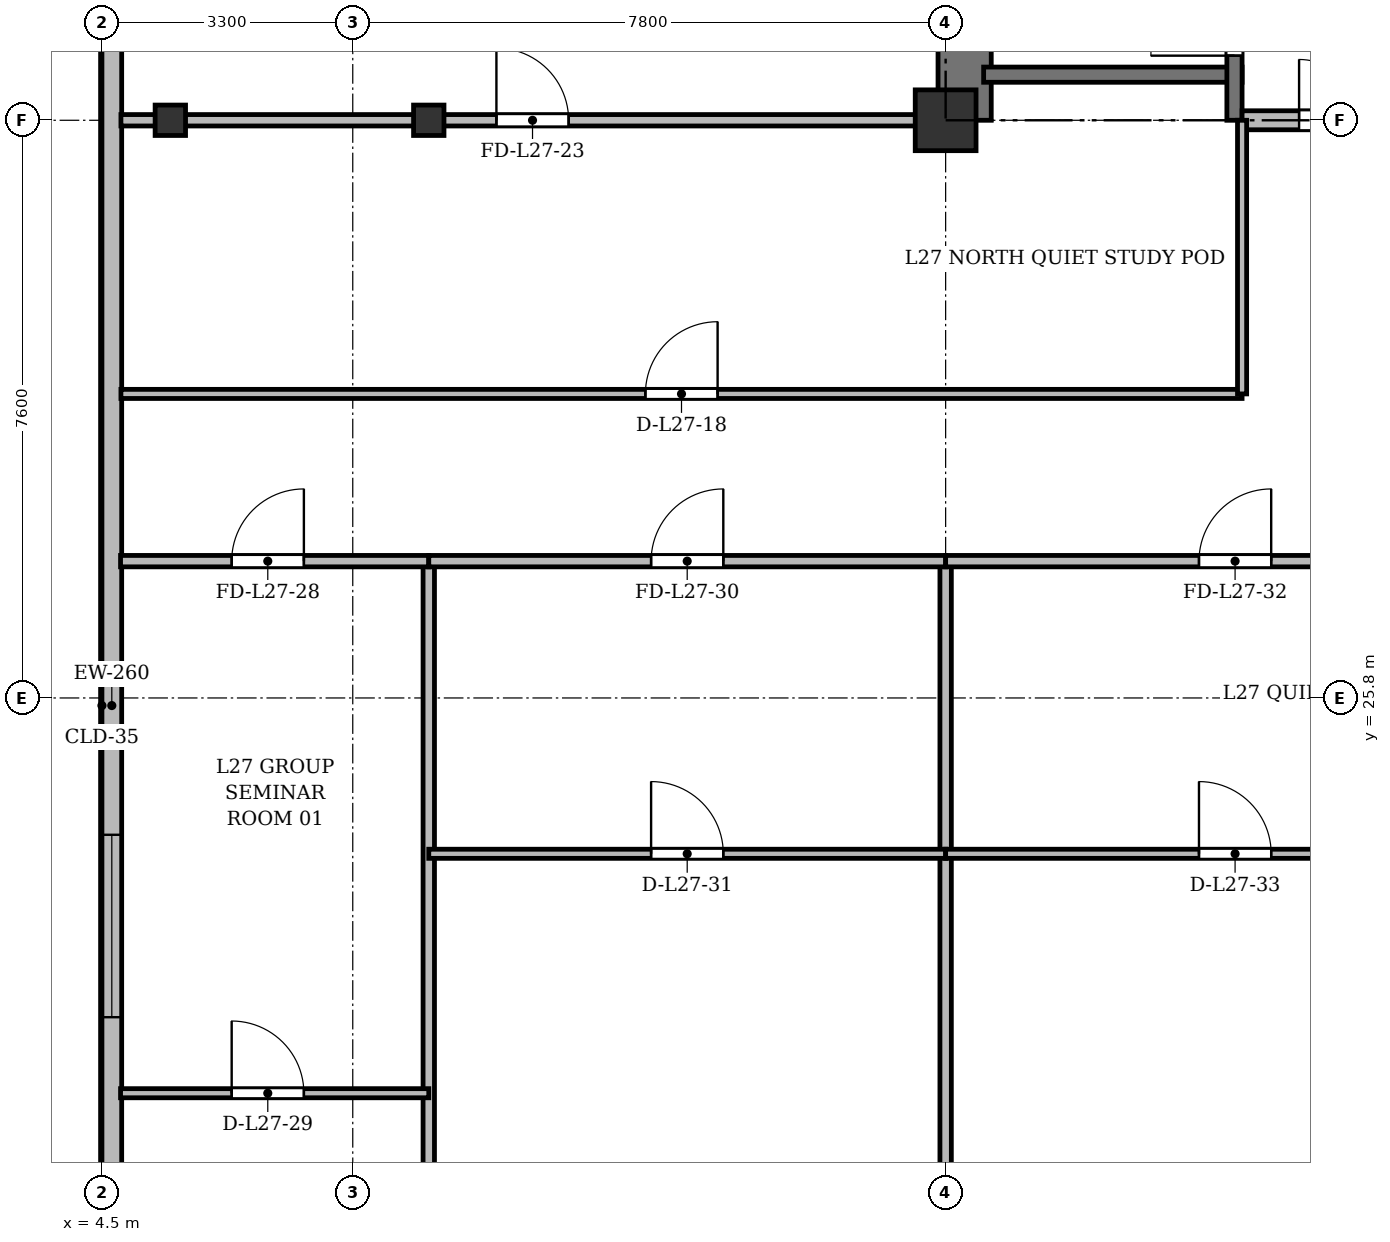
"""IFC4 building model, lengths in metres.
Left out: names, types, materials, properties, quantities, classifications, styles, units other than length and angle.
Written with IfcOpenShell. Run it as: python <this file> out.ifc"""

import sys

from ifc_helpers import new_model, si_unit, direction, frame, frame_2d, origin, origin_2d, place, context, subcontext, project, spatial, rectangle, i_section, extrude, source, transform, mapped, element, fill, save


model = new_model("IFC4")
c1 = context("Model", 3, precision=1e-05, world=origin(), true_north=direction((0.0, 1.0)))
c2 = subcontext(c1, "Body", "Model", "MODEL_VIEW")
j1 = project(units=[si_unit("LENGTHUNIT", "METRE"), si_unit("PLANEANGLEUNIT", "RADIAN")], contexts=[c1])
p1 = place(None, origin())
s1 = spatial("IfcSite", under=j1, at=p1, CompositionType="ELEMENT")
p2 = place(p1, origin())
s2 = spatial("IfcBuilding", under=s1, at=p2, CompositionType="ELEMENT")
p3 = place(p2, frame((0.0, 0.0, 106.9)))
s3 = spatial("IfcBuildingStorey", under=s2, at=p3, CompositionType="ELEMENT", Elevation=106.9)
m1 = source(origin(), c2, "Body", "SweptSolid", [
    extrude(i_section(OverallWidth=0.4, OverallDepth=0.4, WebThickness=0.022, FlangeThickness=0.035, at=origin_2d()), origin(), (0.0, 0.0, 1.0), 3.6),
])
for number, where, z_axis, x_axis in (
    (1, (5.4, 33.4, 0.0), (0.0, 0.0, 1.0), (1.0, 0.0, 0.0)),
    (2, (8.8, 33.4, 0.0), (0.0, 0.0, 1.0), (1.0, 0.0, 0.0)),
):
    element("IfcColumn", number, at=place(p3, frame(where, z_axis=z_axis, x_axis=x_axis)), inside=s3, PredefinedType="COLUMN", context=c2, shape_type="MappedRepresentation", body=[
        mapped(m1, transform((0.0, 0.0, 0.0), x_axis=(1.0, 0.0, 0.0), y_axis=(0.0, 1.0, 0.0), z_axis=(0.0, 0.0, 1.0), scale=1.0)),
    ])
m2 = source(origin(), c2, "Body", "SweptSolid", [
    extrude(rectangle(XDim=0.8, YDim=0.8, at=origin_2d()), origin(), (0.0, 0.0, 1.0), 3.6),
])
p4 = place(p3, frame((15.6, 33.4, 0.0), z_axis=(0.0, 0.0, 1.0), x_axis=(1.0, 0.0, 0.0)))
e3 = element("IfcColumn", 3, at=p4, inside=s3, PredefinedType="COLUMN", context=c2, shape_type="MappedRepresentation", body=[
    mapped(m2, transform((0.0, 0.0, 0.0), x_axis=(1.0, 0.0, 0.0), y_axis=(0.0, 1.0, 0.0), z_axis=(0.0, 0.0, 1.0), scale=1.0)),
])
p5 = place(p3, frame((4.63, 5.9, 0.0), z_axis=(0.0, 0.0, 1.0), x_axis=(0.0, 1.0, 0.0)))
e4 = element("IfcWall", 4, at=p5, inside=s3, PredefinedType="SOLIDWALL", context=c2, shape_type="SweptSolid", body=[
    extrude(rectangle(XDim=39.6, YDim=0.26, at=frame_2d((19.8, 0.0))), origin(), (0.0, 0.0, 1.0), 3.34),
])
p6 = place(p5, frame((1.45, 0.0, 0.92)))
e5 = element("IfcOpeningElement", 5, at=p6, cuts=e4, PredefinedType="OPENING", context=c2, shape_type="SweptSolid", body=[
    extrude(rectangle(XDim=1.2, YDim=1.65, at=frame_2d((0.6, 0.825))), frame((0.0, 0.14, 0.0), z_axis=(0.0, -1.0, 0.0), x_axis=(1.0, 0.0, 0.0)), (0.0, 0.0, 1.0), 0.28),
])
p7 = place(p5, frame((4.3, 0.0, 0.92)))
e6 = element("IfcOpeningElement", 6, at=p7, cuts=e4, PredefinedType="OPENING", context=c2, shape_type="SweptSolid", body=[
    extrude(rectangle(XDim=2.4, YDim=2.1, at=frame_2d((1.2, 1.05))), frame((0.0, 0.14, 0.0), z_axis=(0.0, -1.0, 0.0), x_axis=(1.0, 0.0, 0.0)), (0.0, 0.0, 1.0), 0.28),
])
p8 = place(p5, frame((8.5, 0.0, 0.92)))
e7 = element("IfcOpeningElement", 7, at=p8, cuts=e4, PredefinedType="OPENING", context=c2, shape_type="SweptSolid", body=[
    extrude(rectangle(XDim=2.4, YDim=2.1, at=frame_2d((1.2, 1.05))), frame((0.0, 0.14, 0.0), z_axis=(0.0, -1.0, 0.0), x_axis=(1.0, 0.0, 0.0)), (0.0, 0.0, 1.0), 0.28),
])
p9 = place(p5, frame((15.7, 0.0, 0.92)))
e8 = element("IfcOpeningElement", 8, at=p9, cuts=e4, PredefinedType="OPENING", context=c2, shape_type="SweptSolid", body=[
    extrude(rectangle(XDim=2.4, YDim=2.1, at=frame_2d((1.2, 1.05))), frame((0.0, 0.14, 0.0), z_axis=(0.0, -1.0, 0.0), x_axis=(1.0, 0.0, 0.0)), (0.0, 0.0, 1.0), 0.28),
])
p10 = place(p5, frame((29.7, 0.0, 0.92)))
e9 = element("IfcOpeningElement", 9, at=p10, cuts=e4, PredefinedType="OPENING", context=c2, shape_type="SweptSolid", body=[
    extrude(rectangle(XDim=2.4, YDim=2.1, at=frame_2d((1.2, 1.05))), frame((0.0, 0.14, 0.0), z_axis=(0.0, -1.0, 0.0), x_axis=(1.0, 0.0, 0.0)), (0.0, 0.0, 1.0), 0.28),
])
p11 = place(p5, frame((33.9, 0.0, 0.92)))
e10 = element("IfcOpeningElement", 10, at=p11, cuts=e4, PredefinedType="OPENING", context=c2, shape_type="SweptSolid", body=[
    extrude(rectangle(XDim=1.2, YDim=1.65, at=frame_2d((0.6, 0.825))), frame((0.0, 0.14, 0.0), z_axis=(0.0, -1.0, 0.0), x_axis=(1.0, 0.0, 0.0)), (0.0, 0.0, 1.0), 0.28),
])
p12 = place(p5, frame((37.25, 0.0, 0.92)))
e11 = element("IfcOpeningElement", 11, at=p12, cuts=e4, PredefinedType="OPENING", context=c2, shape_type="SweptSolid", body=[
    extrude(rectangle(XDim=1.2, YDim=1.65, at=frame_2d((0.6, 0.825))), frame((0.0, 0.14, 0.0), z_axis=(0.0, -1.0, 0.0), x_axis=(1.0, 0.0, 0.0)), (0.0, 0.0, 1.0), 0.28),
])
p13 = place(p3, frame((15.85, 33.4, 0.0), z_axis=(0.0, 0.0, 1.0), x_axis=(0.0, 1.0, 0.0)))
e12 = element("IfcWall", 12, at=p13, inside=s3, PredefinedType="SHEAR", context=c2, shape_type="SweptSolid", body=[
    extrude(rectangle(XDim=11.7, YDim=0.7, at=frame_2d((5.85, 0.0))), origin(), (0.0, 0.0, 1.0), 3.34),
])
p14 = place(p3, frame((16.1, 34.0, 0.0), z_axis=(0.0, 0.0, 1.0), x_axis=(1.0, 0.0, 0.0)))
e13 = element("IfcWall", 13, at=p14, inside=s3, PredefinedType="SHEAR", context=c2, shape_type="SweptSolid", body=[
    extrude(rectangle(XDim=3.4, YDim=0.2, at=frame_2d((1.7, 0.0))), origin(), (0.0, 0.0, 1.0), 3.34),
])
p15 = place(p3, frame((19.4, 33.4, 0.0), z_axis=(0.0, 0.0, 1.0), x_axis=(0.0, 1.0, 0.0)))
e14 = element("IfcWall", 14, at=p15, inside=s3, PredefinedType="SHEAR", context=c2, shape_type="SweptSolid", body=[
    extrude(rectangle(XDim=11.1, YDim=0.2, at=frame_2d((5.55, 0.0))), origin(), (0.0, 0.0, 1.0), 3.34),
])
p16 = place(p15, frame((0.85, 0.0, 0.0)))
e15 = element("IfcOpeningElement", 15, at=p16, cuts=e14, PredefinedType="OPENING", context=c2, shape_type="SweptSolid", body=[
    extrude(rectangle(XDim=1.1, YDim=2.15, at=frame_2d((0.55, 1.075))), frame((0.0, 0.11, 0.0), z_axis=(0.0, -1.0, 0.0), x_axis=(1.0, 0.0, 0.0)), (0.0, 0.0, 1.0), 0.22),
])
p17 = place(p3, frame((19.5, 33.4, 0.0), z_axis=(0.0, 0.0, 1.0), x_axis=(1.0, 0.0, 0.0)))
e16 = element("IfcWall", 16, at=p17, inside=s3, PredefinedType="PARTITIONING", context=c2, shape_type="SweptSolid", body=[
    extrude(rectangle(XDim=6.8, YDim=0.25, at=frame_2d((3.4, 0.0))), origin(), (0.0, 0.0, 1.0), 2.752),
])
p18 = place(p17, frame((0.75, 0.0, 0.0)))
e17 = element("IfcOpeningElement", 17, at=p18, cuts=e16, PredefinedType="OPENING", context=c2, shape_type="SweptSolid", body=[
    extrude(rectangle(XDim=1.6, YDim=2.2, at=frame_2d((0.8, 1.1))), frame((0.0, 0.135, 0.0), z_axis=(0.0, -1.0, 0.0), x_axis=(1.0, 0.0, 0.0)), (0.0, 0.0, 1.0), 0.27),
])
p19 = place(p3, frame((4.75, 29.8, 0.0), z_axis=(0.0, 0.0, 1.0), x_axis=(1.0, 0.0, 0.0)))
e18 = element("IfcWall", 18, at=p19, inside=s3, PredefinedType="PARTITIONING", context=c2, shape_type="SweptSolid", body=[
    extrude(rectangle(XDim=14.75, YDim=0.12, at=frame_2d((7.375, 0.0))), origin(), (0.0, 0.0, 1.0), 2.84),
])
p20 = place(p19, frame((6.9, 0.0, 0.0)))
e19 = element("IfcOpeningElement", 19, at=p20, cuts=e18, PredefinedType="OPENING", context=c2, shape_type="SweptSolid", body=[
    extrude(rectangle(XDim=0.95, YDim=2.15, at=frame_2d((0.475, 1.075))), frame((0.0, 0.07, 0.0), z_axis=(0.0, -1.0, 0.0), x_axis=(1.0, 0.0, 0.0)), (0.0, 0.0, 1.0), 0.14),
])
p21 = place(p3, frame((19.5, 29.8, 0.0), z_axis=(0.0, 0.0, 1.0), x_axis=(0.0, 1.0, 0.0)))
e20 = element("IfcWall", 20, at=p21, inside=s3, PredefinedType="PARTITIONING", context=c2, shape_type="SweptSolid", body=[
    extrude(rectangle(XDim=3.6, YDim=0.12, at=frame_2d((1.8, 0.0))), origin(), (0.0, 0.0, 1.0), 2.752),
])
p22 = place(p3, frame((4.75, 33.4, 0.0), z_axis=(0.0, 0.0, 1.0), x_axis=(1.0, 0.0, 0.0)))
e21 = element("IfcWall", 21, at=p22, inside=s3, PredefinedType="PARTITIONING", context=c2, shape_type="SweptSolid", body=[
    extrude(rectangle(XDim=10.85, YDim=0.15, at=frame_2d((5.425, 0.0))), origin(), (0.0, 0.0, 1.0), 2.752),
])
p23 = place(p22, frame((4.94, 0.0, 0.0)))
e22 = element("IfcOpeningElement", 22, at=p23, cuts=e21, PredefinedType="OPENING", context=c2, shape_type="SweptSolid", body=[
    extrude(rectangle(XDim=0.95, YDim=2.15, at=frame_2d((0.475, 1.075))), frame((0.0, 0.085, 0.0), z_axis=(0.0, -1.0, 0.0), x_axis=(1.0, 0.0, 0.0)), (0.0, 0.0, 1.0), 0.17),
])
for number, where, z_axis, x_axis in (
    (23, (8.8, 3.145, 0.0), (0.0, 0.0, 1.0), (0.0, 1.0, 0.0)),
    (24, (15.6, 3.145, 0.0), (0.0, 0.0, 1.0), (0.0, 1.0, 0.0)),
):
    element("IfcWall", number, at=place(p3, frame(where, z_axis=z_axis, x_axis=x_axis)), inside=s3, PredefinedType="PARTITIONING", context=c2, shape_type="SweptSolid", body=[
        extrude(rectangle(XDim=24.455, YDim=0.15, at=frame_2d((12.228, 0.0))), origin(), (0.0, 0.0, 1.0), 2.84),
    ])
p24 = place(p3, frame((4.745, 27.6, 0.0), z_axis=(0.0, 0.0, 1.0), x_axis=(1.0, 0.0, 0.0)))
e25 = element("IfcWall", 25, at=p24, inside=s3, PredefinedType="PARTITIONING", context=c2, shape_type="SweptSolid", body=[
    extrude(rectangle(XDim=4.055, YDim=0.15, at=frame_2d((2.027, 0.0))), origin(), (0.0, 0.0, 1.0), 2.84),
])
p25 = place(p24, frame((1.462, 0.0, 0.0)))
e26 = element("IfcOpeningElement", 26, at=p25, cuts=e25, PredefinedType="OPENING", context=c2, shape_type="SweptSolid", body=[
    extrude(rectangle(XDim=0.95, YDim=2.15, at=frame_2d((0.475, 1.075))), frame((0.0, 0.085, 0.0), z_axis=(0.0, -1.0, 0.0), x_axis=(1.0, 0.0, 0.0)), (0.0, 0.0, 1.0), 0.17),
])
p26 = place(p3, frame((4.745, 20.6, 0.0), z_axis=(0.0, 0.0, 1.0), x_axis=(1.0, 0.0, 0.0)))
e27 = element("IfcWall", 27, at=p26, inside=s3, PredefinedType="PARTITIONING", context=c2, shape_type="SweptSolid", body=[
    extrude(rectangle(XDim=4.055, YDim=0.12, at=frame_2d((2.027, 0.0))), origin(), (0.0, 0.0, 1.0), 2.84),
])
p27 = place(p26, frame((1.462, 0.0, 0.0)))
e28 = element("IfcOpeningElement", 28, at=p27, cuts=e27, PredefinedType="OPENING", context=c2, shape_type="SweptSolid", body=[
    extrude(rectangle(XDim=0.95, YDim=2.15, at=frame_2d((0.475, 1.075))), frame((0.0, 0.07, 0.0), z_axis=(0.0, -1.0, 0.0), x_axis=(1.0, 0.0, 0.0)), (0.0, 0.0, 1.0), 0.14),
])
p28 = place(p3, frame((8.8, 27.6, 0.0), z_axis=(0.0, 0.0, 1.0), x_axis=(1.0, 0.0, 0.0)))
e29 = element("IfcWall", 29, at=p28, inside=s3, PredefinedType="PARTITIONING", context=c2, shape_type="SweptSolid", body=[
    extrude(rectangle(XDim=6.8, YDim=0.15, at=frame_2d((3.4, 0.0))), origin(), (0.0, 0.0, 1.0), 2.84),
])
p29 = place(p28, frame((2.925, 0.0, 0.0)))
e30 = element("IfcOpeningElement", 30, at=p29, cuts=e29, PredefinedType="OPENING", context=c2, shape_type="SweptSolid", body=[
    extrude(rectangle(XDim=0.95, YDim=2.15, at=frame_2d((0.475, 1.075))), frame((0.0, 0.085, 0.0), z_axis=(0.0, -1.0, 0.0), x_axis=(1.0, 0.0, 0.0)), (0.0, 0.0, 1.0), 0.17),
])
p30 = place(p3, frame((8.8, 23.75, 0.0), z_axis=(0.0, 0.0, 1.0), x_axis=(1.0, 0.0, 0.0)))
e31 = element("IfcWall", 31, at=p30, inside=s3, PredefinedType="PARTITIONING", context=c2, shape_type="SweptSolid", body=[
    extrude(rectangle(XDim=6.8, YDim=0.12, at=frame_2d((3.4, 0.0))), origin(), (0.0, 0.0, 1.0), 2.84),
])
p31 = place(p30, frame((2.925, 0.0, 0.0)))
e32 = element("IfcOpeningElement", 32, at=p31, cuts=e31, PredefinedType="OPENING", context=c2, shape_type="SweptSolid", body=[
    extrude(rectangle(XDim=0.95, YDim=2.15, at=frame_2d((0.475, 1.075))), frame((0.0, 0.07, 0.0), z_axis=(0.0, -1.0, 0.0), x_axis=(1.0, 0.0, 0.0)), (0.0, 0.0, 1.0), 0.14),
])
p32 = place(p3, frame((15.6, 27.6, 0.0), z_axis=(0.0, 0.0, 1.0), x_axis=(1.0, 0.0, 0.0)))
e33 = element("IfcWall", 33, at=p32, inside=s3, PredefinedType="PARTITIONING", context=c2, shape_type="SweptSolid", body=[
    extrude(rectangle(XDim=7.8, YDim=0.15, at=frame_2d((3.9, 0.0))), origin(), (0.0, 0.0, 1.0), 2.84),
])
p33 = place(p32, frame((3.333, 0.0, 0.0)))
e34 = element("IfcOpeningElement", 34, at=p33, cuts=e33, PredefinedType="OPENING", context=c2, shape_type="SweptSolid", body=[
    extrude(rectangle(XDim=0.95, YDim=2.15, at=frame_2d((0.475, 1.075))), frame((0.0, 0.085, 0.0), z_axis=(0.0, -1.0, 0.0), x_axis=(1.0, 0.0, 0.0)), (0.0, 0.0, 1.0), 0.17),
])
p34 = place(p3, frame((15.6, 23.75, 0.0), z_axis=(0.0, 0.0, 1.0), x_axis=(1.0, 0.0, 0.0)))
e35 = element("IfcWall", 35, at=p34, inside=s3, PredefinedType="PARTITIONING", context=c2, shape_type="SweptSolid", body=[
    extrude(rectangle(XDim=7.8, YDim=0.12, at=frame_2d((3.9, 0.0))), origin(), (0.0, 0.0, 1.0), 2.84),
])
p35 = place(p34, frame((3.333, 0.0, 0.0)))
e36 = element("IfcOpeningElement", 36, at=p35, cuts=e35, PredefinedType="OPENING", context=c2, shape_type="SweptSolid", body=[
    extrude(rectangle(XDim=0.95, YDim=2.15, at=frame_2d((0.475, 1.075))), frame((0.0, 0.07, 0.0), z_axis=(0.0, -1.0, 0.0), x_axis=(1.0, 0.0, 0.0)), (0.0, 0.0, 1.0), 0.14),
])
m3 = source(origin(), c2, "Body", "SweptSolid", [
    extrude(rectangle(XDim=2.4, YDim=2.1, at=frame_2d((1.2, 1.05))), frame((0.0, 0.03, 0.0), z_axis=(0.0, -1.0, 0.0), x_axis=(1.0, 0.0, 0.0)), (0.0, 0.0, 1.0), 0.06),
])
p36 = place(p9, origin())
e37 = element("IfcWindow", 37, at=p36, inside=s3, PartitioningType="SINGLE_PANEL", PredefinedType="WINDOW", context=c2, shape_type="MappedRepresentation", body=[
    mapped(m3, transform((0.0, 0.0, 0.0), x_axis=(1.0, 0.0, 0.0), y_axis=(0.0, 1.0, 0.0), z_axis=(0.0, 0.0, 1.0), scale=1.0)),
])
fill(e8, e37)
m4 = source(origin(), c2, "Body", "SweptSolid", [
    extrude(rectangle(XDim=1.1, YDim=2.15, at=frame_2d((0.55, 1.075))), frame((0.0, 0.025, 0.0), z_axis=(0.0, -1.0, 0.0), x_axis=(1.0, 0.0, 0.0)), (0.0, 0.0, 1.0), 0.05),
])
p37 = place(p16, origin())
e38 = element("IfcDoor", 38, at=p37, inside=s3, OperationType="SINGLE_SWING_LEFT", PredefinedType="DOOR", context=c2, shape_type="MappedRepresentation", body=[
    mapped(m4, transform((0.0, 0.0, 0.0), x_axis=(1.0, 0.0, 0.0), y_axis=(0.0, 1.0, 0.0), z_axis=(0.0, 0.0, 1.0), scale=1.0)),
])
fill(e15, e38)
m5 = source(origin(), c2, "Body", "SweptSolid", [
    extrude(rectangle(XDim=1.6, YDim=2.2, at=frame_2d((0.8, 1.1))), frame((0.0, 0.025, 0.0), z_axis=(0.0, -1.0, 0.0), x_axis=(1.0, 0.0, 0.0)), (0.0, 0.0, 1.0), 0.05),
])
p38 = place(p18, origin())
e39 = element("IfcDoor", 39, at=p38, inside=s3, OperationType="DOUBLE_DOOR_SINGLE_SWING", PredefinedType="DOOR", context=c2, shape_type="MappedRepresentation", body=[
    mapped(m5, transform((0.0, 0.0, 0.0), x_axis=(1.0, 0.0, 0.0), y_axis=(0.0, 1.0, 0.0), z_axis=(0.0, 0.0, 1.0), scale=1.0)),
])
fill(e17, e39)
m6 = source(origin(), c2, "Body", "SweptSolid", [
    extrude(rectangle(XDim=0.95, YDim=2.15, at=frame_2d((0.475, 1.075))), frame((0.0, 0.025, 0.0), z_axis=(0.0, -1.0, 0.0), x_axis=(1.0, 0.0, 0.0)), (0.0, 0.0, 1.0), 0.05),
])
p39 = place(p20, origin())
e40 = element("IfcDoor", 40, at=p39, inside=s3, OperationType="SINGLE_SWING_RIGHT", PredefinedType="DOOR", context=c2, shape_type="MappedRepresentation", body=[
    mapped(m6, transform((0.0, 0.0, 0.0), x_axis=(1.0, 0.0, 0.0), y_axis=(0.0, 1.0, 0.0), z_axis=(0.0, 0.0, 1.0), scale=1.0)),
])
fill(e19, e40)
p40 = place(p23, origin())
e41 = element("IfcDoor", 41, at=p40, inside=s3, OperationType="SINGLE_SWING_LEFT", PredefinedType="DOOR", context=c2, shape_type="MappedRepresentation", body=[
    mapped(m6, transform((0.0, 0.0, 0.0), x_axis=(1.0, 0.0, 0.0), y_axis=(0.0, 1.0, 0.0), z_axis=(0.0, 0.0, 1.0), scale=1.0)),
])
fill(e22, e41)
p41 = place(p25, origin())
e42 = element("IfcDoor", 42, at=p41, inside=s3, OperationType="SINGLE_SWING_RIGHT", PredefinedType="DOOR", context=c2, shape_type="MappedRepresentation", body=[
    mapped(m6, transform((0.0, 0.0, 0.0), x_axis=(1.0, 0.0, 0.0), y_axis=(0.0, 1.0, 0.0), z_axis=(0.0, 0.0, 1.0), scale=1.0)),
])
fill(e26, e42)
p42 = place(p27, origin())
e43 = element("IfcDoor", 43, at=p42, inside=s3, OperationType="SINGLE_SWING_LEFT", PredefinedType="DOOR", context=c2, shape_type="MappedRepresentation", body=[
    mapped(m6, transform((0.0, 0.0, 0.0), x_axis=(1.0, 0.0, 0.0), y_axis=(0.0, 1.0, 0.0), z_axis=(0.0, 0.0, 1.0), scale=1.0)),
])
fill(e28, e43)
p43 = place(p29, origin())
e44 = element("IfcDoor", 44, at=p43, inside=s3, OperationType="SINGLE_SWING_RIGHT", PredefinedType="DOOR", context=c2, shape_type="MappedRepresentation", body=[
    mapped(m6, transform((0.0, 0.0, 0.0), x_axis=(1.0, 0.0, 0.0), y_axis=(0.0, 1.0, 0.0), z_axis=(0.0, 0.0, 1.0), scale=1.0)),
])
fill(e30, e44)
p44 = place(p31, origin())
e45 = element("IfcDoor", 45, at=p44, inside=s3, OperationType="SINGLE_SWING_LEFT", PredefinedType="DOOR", context=c2, shape_type="MappedRepresentation", body=[
    mapped(m6, transform((0.0, 0.0, 0.0), x_axis=(1.0, 0.0, 0.0), y_axis=(0.0, 1.0, 0.0), z_axis=(0.0, 0.0, 1.0), scale=1.0)),
])
fill(e32, e45)
p45 = place(p33, origin())
e46 = element("IfcDoor", 46, at=p45, inside=s3, OperationType="SINGLE_SWING_RIGHT", PredefinedType="DOOR", context=c2, shape_type="MappedRepresentation", body=[
    mapped(m6, transform((0.0, 0.0, 0.0), x_axis=(1.0, 0.0, 0.0), y_axis=(0.0, 1.0, 0.0), z_axis=(0.0, 0.0, 1.0), scale=1.0)),
])
fill(e34, e46)
p46 = place(p35, origin())
e47 = element("IfcDoor", 47, at=p46, inside=s3, OperationType="SINGLE_SWING_LEFT", PredefinedType="DOOR", context=c2, shape_type="MappedRepresentation", body=[
    mapped(m6, transform((0.0, 0.0, 0.0), x_axis=(1.0, 0.0, 0.0), y_axis=(0.0, 1.0, 0.0), z_axis=(0.0, 0.0, 1.0), scale=1.0)),
])
fill(e36, e47)
save(model, sys.argv[1])
